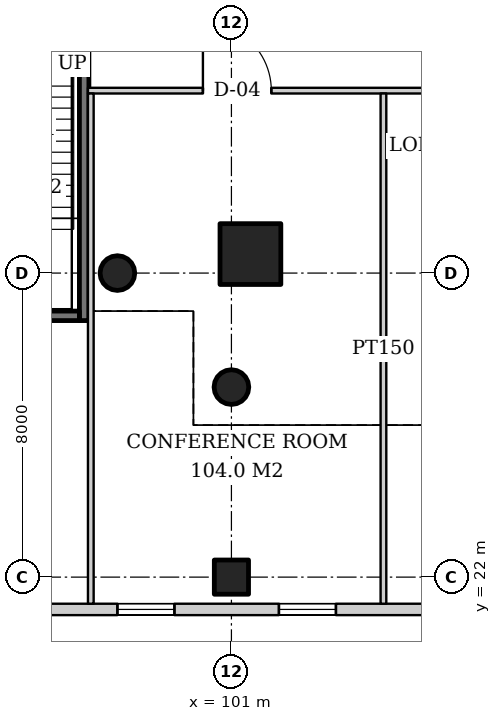
"""IFC4 building model, lengths in metres.
Left out: names, types, materials, properties, quantities, classifications, styles, units other than length and angle.
Written with IfcOpenShell. Run it as: python <this file> out.ifc"""

import sys

from ifc_helpers import new_model, si_unit, direction, frame, frame_2d, origin, origin_2d, place, context, subcontext, project, spatial, rectangle, hollow_circle, extrude, element, fill, save


model = new_model("IFC4")
c1 = context("Model", 3, precision=1e-05, world=origin(), true_north=direction((0.0, 1.0)))
c2 = subcontext(c1, "Body", "Model", "MODEL_VIEW")
j1 = project(units=[si_unit("LENGTHUNIT", "METRE"), si_unit("PLANEANGLEUNIT", "RADIAN")], contexts=[c1])
p1 = place(None, origin())
s1 = spatial("IfcSite", under=j1, at=p1, CompositionType="ELEMENT")
p2 = place(p1, origin())
s2 = spatial("IfcBuilding", under=s1, at=p2, CompositionType="ELEMENT")
p3 = place(p2, frame((0.0, 0.0, 11.0)))
s3 = spatial("IfcBuildingStorey", under=s2, at=p3, CompositionType="ELEMENT", Elevation=11.0)
p4 = place(p3, frame((101.0, 22.0, 0.0), z_axis=(0.0, 0.0, 1.0), x_axis=(1.0, 0.0, 0.0)))
e1 = element("IfcColumn", 1, at=p4, inside=s3, PredefinedType="COLUMN", context=c2, shape_type="SweptSolid", body=[
    extrude(rectangle(XDim=0.9, YDim=0.9, at=origin_2d()), origin(), (0.0, 0.0, 1.0), 5.0),
])
p5 = place(p3, frame((101.5, 30.5, 0.0), z_axis=(0.0, 0.0, 1.0), x_axis=(1.0, 0.0, 0.0)))
e2 = element("IfcColumn", 2, at=p5, inside=s3, PredefinedType="COLUMN", context=c2, shape_type="SweptSolid", body=[
    extrude(rectangle(XDim=1.6, YDim=1.6, at=origin_2d()), origin(), (0.0, 0.0, 1.0), 5.0),
])
for number, where, z_axis, x_axis in (
    (3, (98.0, 30.0, 0.0), (0.0, 0.0, 1.0), (1.0, 0.0, 0.0)),
    (4, (101.0, 27.0, 0.0), (0.0, 0.0, 1.0), (1.0, 0.0, 0.0)),
):
    element("IfcColumn", number, at=place(p3, frame(where, z_axis=z_axis, x_axis=x_axis)), inside=s3, PredefinedType="COLUMN", context=c2, shape_type="SweptSolid", body=[
        extrude(hollow_circle(Radius=0.457, WallThickness=0.03, at=origin_2d()), origin(), (0.0, 0.0, 1.0), 5.0),
    ])
p6 = place(p3, frame((92.0, 21.15, 0.0), z_axis=(0.0, 0.0, 1.0), x_axis=(1.0, 0.0, 0.0)))
e5 = element("IfcWall", 5, at=p6, inside=s3, PredefinedType="SOLIDWALL", context=c2, shape_type="SweptSolid", body=[
    extrude(rectangle(XDim=50.0, YDim=0.3, at=frame_2d((25.0, 0.0))), origin(), (0.0, 0.0, 1.0), 4.7),
])
p7 = place(p6, frame((1.5, 0.0, 0.9)))
e6 = element("IfcOpeningElement", 6, at=p7, cuts=e5, PredefinedType="OPENING", context=c2, shape_type="SweptSolid", body=[
    extrude(rectangle(XDim=1.5, YDim=3.2, at=frame_2d((0.75, 1.6))), frame((0.0, 0.16, 0.0), z_axis=(0.0, -1.0, 0.0), x_axis=(1.0, 0.0, 0.0)), (0.0, 0.0, 1.0), 0.32),
])
p8 = place(p6, frame((6.0, 0.0, 0.9)))
e7 = element("IfcOpeningElement", 7, at=p8, cuts=e5, PredefinedType="OPENING", context=c2, shape_type="SweptSolid", body=[
    extrude(rectangle(XDim=1.5, YDim=3.2, at=frame_2d((0.75, 1.6))), frame((0.0, 0.16, 0.0), z_axis=(0.0, -1.0, 0.0), x_axis=(1.0, 0.0, 0.0)), (0.0, 0.0, 1.0), 0.32),
])
p9 = place(p6, frame((10.25, 0.0, 0.9)))
e8 = element("IfcOpeningElement", 8, at=p9, cuts=e5, PredefinedType="OPENING", context=c2, shape_type="SweptSolid", body=[
    extrude(rectangle(XDim=1.5, YDim=3.2, at=frame_2d((0.75, 1.6))), frame((0.0, 0.16, 0.0), z_axis=(0.0, -1.0, 0.0), x_axis=(1.0, 0.0, 0.0)), (0.0, 0.0, 1.0), 0.32),
])
p10 = place(p6, frame((14.25, 0.0, 0.9)))
e9 = element("IfcOpeningElement", 9, at=p10, cuts=e5, PredefinedType="OPENING", context=c2, shape_type="SweptSolid", body=[
    extrude(rectangle(XDim=1.5, YDim=3.2, at=frame_2d((0.75, 1.6))), frame((0.0, 0.16, 0.0), z_axis=(0.0, -1.0, 0.0), x_axis=(1.0, 0.0, 0.0)), (0.0, 0.0, 1.0), 0.32),
])
p11 = place(p6, frame((18.25, 0.0, 0.9)))
e10 = element("IfcOpeningElement", 10, at=p11, cuts=e5, PredefinedType="OPENING", context=c2, shape_type="SweptSolid", body=[
    extrude(rectangle(XDim=1.5, YDim=3.2, at=frame_2d((0.75, 1.6))), frame((0.0, 0.16, 0.0), z_axis=(0.0, -1.0, 0.0), x_axis=(1.0, 0.0, 0.0)), (0.0, 0.0, 1.0), 0.32),
])
p12 = place(p6, frame((22.25, 0.0, 0.9)))
e11 = element("IfcOpeningElement", 11, at=p12, cuts=e5, PredefinedType="OPENING", context=c2, shape_type="SweptSolid", body=[
    extrude(rectangle(XDim=1.5, YDim=3.2, at=frame_2d((0.75, 1.6))), frame((0.0, 0.16, 0.0), z_axis=(0.0, -1.0, 0.0), x_axis=(1.0, 0.0, 0.0)), (0.0, 0.0, 1.0), 0.32),
])
p13 = place(p6, frame((26.1, 0.0, 0.0)))
e12 = element("IfcOpeningElement", 12, at=p13, cuts=e5, PredefinedType="OPENING", context=c2, shape_type="SweptSolid", body=[
    extrude(rectangle(XDim=1.8, YDim=2.4, at=frame_2d((0.9, 1.2))), frame((0.0, 0.16, 0.0), z_axis=(0.0, -1.0, 0.0), x_axis=(1.0, 0.0, 0.0)), (0.0, 0.0, 1.0), 0.32),
])
p14 = place(p6, frame((30.25, 0.0, 0.9)))
e13 = element("IfcOpeningElement", 13, at=p14, cuts=e5, PredefinedType="OPENING", context=c2, shape_type="SweptSolid", body=[
    extrude(rectangle(XDim=1.5, YDim=3.2, at=frame_2d((0.75, 1.6))), frame((0.0, 0.16, 0.0), z_axis=(0.0, -1.0, 0.0), x_axis=(1.0, 0.0, 0.0)), (0.0, 0.0, 1.0), 0.32),
])
p15 = place(p6, frame((34.25, 0.0, 0.9)))
e14 = element("IfcOpeningElement", 14, at=p15, cuts=e5, PredefinedType="OPENING", context=c2, shape_type="SweptSolid", body=[
    extrude(rectangle(XDim=1.5, YDim=3.2, at=frame_2d((0.75, 1.6))), frame((0.0, 0.16, 0.0), z_axis=(0.0, -1.0, 0.0), x_axis=(1.0, 0.0, 0.0)), (0.0, 0.0, 1.0), 0.32),
])
p16 = place(p6, frame((38.25, 0.0, 0.9)))
e15 = element("IfcOpeningElement", 15, at=p16, cuts=e5, PredefinedType="OPENING", context=c2, shape_type="SweptSolid", body=[
    extrude(rectangle(XDim=1.5, YDim=3.2, at=frame_2d((0.75, 1.6))), frame((0.0, 0.16, 0.0), z_axis=(0.0, -1.0, 0.0), x_axis=(1.0, 0.0, 0.0)), (0.0, 0.0, 1.0), 0.32),
])
p17 = place(p6, frame((42.5, 0.0, 0.9)))
e16 = element("IfcOpeningElement", 16, at=p17, cuts=e5, PredefinedType="OPENING", context=c2, shape_type="SweptSolid", body=[
    extrude(rectangle(XDim=1.5, YDim=3.2, at=frame_2d((0.75, 1.6))), frame((0.0, 0.16, 0.0), z_axis=(0.0, -1.0, 0.0), x_axis=(1.0, 0.0, 0.0)), (0.0, 0.0, 1.0), 0.32),
])
p18 = place(p6, frame((47.0, 0.0, 0.9)))
e17 = element("IfcOpeningElement", 17, at=p18, cuts=e5, PredefinedType="OPENING", context=c2, shape_type="SweptSolid", body=[
    extrude(rectangle(XDim=1.5, YDim=3.2, at=frame_2d((0.75, 1.6))), frame((0.0, 0.16, 0.0), z_axis=(0.0, -1.0, 0.0), x_axis=(1.0, 0.0, 0.0)), (0.0, 0.0, 1.0), 0.32),
])
p19 = place(p3, frame((97.125, 28.75, 0.0), z_axis=(0.0, 0.0, 1.0), x_axis=(0.0, 1.0, 0.0)))
e18 = element("IfcWall", 18, at=p19, inside=s3, PredefinedType="SOLIDWALL", context=c2, shape_type="SweptSolid", body=[
    extrude(rectangle(XDim=8.5, YDim=0.25, at=frame_2d((4.25, 0.0))), origin(), (0.0, 0.0, 1.0), 4.7),
])
p20 = place(p3, frame((94.0, 28.875, 0.0), z_axis=(0.0, 0.0, 1.0), x_axis=(1.0, 0.0, 0.0)))
e19 = element("IfcWall", 19, at=p20, inside=s3, PredefinedType="SOLIDWALL", context=c2, shape_type="SweptSolid", body=[
    extrude(rectangle(XDim=3.0, YDim=0.25, at=frame_2d((1.5, 0.0))), origin(), (0.0, 0.0, 1.0), 4.7),
])
p21 = place(p3, frame((97.225, 34.8, 0.0), z_axis=(0.0, 0.0, 1.0), x_axis=(1.0, 0.0, 0.0)))
e20 = element("IfcWall", 20, at=p21, inside=s3, PredefinedType="PARTITIONING", context=c2, shape_type="SweptSolid", body=[
    extrude(rectangle(XDim=39.55, YDim=0.15, at=frame_2d((19.775, 0.0))), origin(), (0.0, 0.0, 1.0), 3.9),
])
p22 = place(p21, frame((3.025, 0.0, 0.0)))
e21 = element("IfcOpeningElement", 21, at=p22, cuts=e20, PredefinedType="OPENING", context=c2, shape_type="SweptSolid", body=[
    extrude(rectangle(XDim=1.8, YDim=2.4, at=frame_2d((0.9, 1.2))), frame((0.0, 0.085, 0.0), z_axis=(0.0, -1.0, 0.0), x_axis=(1.0, 0.0, 0.0)), (0.0, 0.0, 1.0), 0.17),
])
p23 = place(p21, frame((11.275, 0.0, 0.0)))
e22 = element("IfcOpeningElement", 22, at=p23, cuts=e20, PredefinedType="OPENING", context=c2, shape_type="SweptSolid", body=[
    extrude(rectangle(XDim=1.0, YDim=2.1, at=frame_2d((0.5, 1.05))), frame((0.0, 0.085, 0.0), z_axis=(0.0, -1.0, 0.0), x_axis=(1.0, 0.0, 0.0)), (0.0, 0.0, 1.0), 0.17),
])
p24 = place(p21, frame((19.275, 0.0, 0.0)))
e23 = element("IfcOpeningElement", 23, at=p24, cuts=e20, PredefinedType="OPENING", context=c2, shape_type="SweptSolid", body=[
    extrude(rectangle(XDim=1.0, YDim=2.1, at=frame_2d((0.5, 1.05))), frame((0.0, 0.085, 0.0), z_axis=(0.0, -1.0, 0.0), x_axis=(1.0, 0.0, 0.0)), (0.0, 0.0, 1.0), 0.17),
])
p25 = place(p21, frame((27.275, 0.0, 0.0)))
e24 = element("IfcOpeningElement", 24, at=p25, cuts=e20, PredefinedType="OPENING", context=c2, shape_type="SweptSolid", body=[
    extrude(rectangle(XDim=1.0, YDim=2.1, at=frame_2d((0.5, 1.05))), frame((0.0, 0.085, 0.0), z_axis=(0.0, -1.0, 0.0), x_axis=(1.0, 0.0, 0.0)), (0.0, 0.0, 1.0), 0.17),
])
p26 = place(p21, frame((35.125, 0.0, 0.0)))
e25 = element("IfcOpeningElement", 25, at=p26, cuts=e20, PredefinedType="OPENING", context=c2, shape_type="SweptSolid", body=[
    extrude(rectangle(XDim=1.0, YDim=2.1, at=frame_2d((0.5, 1.05))), frame((0.0, 0.085, 0.0), z_axis=(0.0, -1.0, 0.0), x_axis=(1.0, 0.0, 0.0)), (0.0, 0.0, 1.0), 0.17),
])
p27 = place(p3, frame((97.3, 21.3, 0.0), z_axis=(0.0, 0.0, 1.0), x_axis=(0.0, 1.0, 0.0)))
e26 = element("IfcWall", 26, at=p27, inside=s3, PredefinedType="PARTITIONING", context=c2, shape_type="SweptSolid", body=[
    extrude(rectangle(XDim=13.425, YDim=0.15, at=frame_2d((6.712, 0.0))), origin(), (0.0, 0.0, 1.0), 4.7),
])
p28 = place(p3, frame((105.0, 21.3, 0.0), z_axis=(0.0, 0.0, 1.0), x_axis=(0.0, 1.0, 0.0)))
e27 = element("IfcWall", 27, at=p28, inside=s3, PredefinedType="PARTITIONING", context=c2, shape_type="SweptSolid", body=[
    extrude(rectangle(XDim=13.425, YDim=0.15, at=frame_2d((6.712, 0.0))), origin(), (0.0, 0.0, 1.0), 4.15),
])
p29 = place(p8, origin())
e28 = element("IfcWindow", 28, at=p29, inside=s3, PartitioningType="SINGLE_PANEL", PredefinedType="WINDOW", context=c2, shape_type="SweptSolid", body=[
    extrude(rectangle(XDim=1.5, YDim=3.2, at=frame_2d((0.75, 1.6))), frame((0.0, 0.03, 0.0), z_axis=(0.0, -1.0, 0.0), x_axis=(1.0, 0.0, 0.0)), (0.0, 0.0, 1.0), 0.06),
])
fill(e7, e28)
p30 = place(p9, origin())
e29 = element("IfcWindow", 29, at=p30, inside=s3, PartitioningType="SINGLE_PANEL", PredefinedType="WINDOW", context=c2, shape_type="SweptSolid", body=[
    extrude(rectangle(XDim=1.5, YDim=3.2, at=frame_2d((0.75, 1.6))), frame((0.0, 0.03, 0.0), z_axis=(0.0, -1.0, 0.0), x_axis=(1.0, 0.0, 0.0)), (0.0, 0.0, 1.0), 0.06),
])
fill(e8, e29)
p31 = place(p22, origin())
e30 = element("IfcDoor", 30, at=p31, inside=s3, OperationType="DOUBLE_DOOR_SINGLE_SWING", PredefinedType="DOOR", context=c2, shape_type="SweptSolid", body=[
    extrude(rectangle(XDim=1.8, YDim=2.4, at=frame_2d((0.9, 1.2))), frame((0.0, 0.025, 0.0), z_axis=(0.0, -1.0, 0.0), x_axis=(1.0, 0.0, 0.0)), (0.0, 0.0, 1.0), 0.05),
])
fill(e21, e30)
save(model, sys.argv[1])
